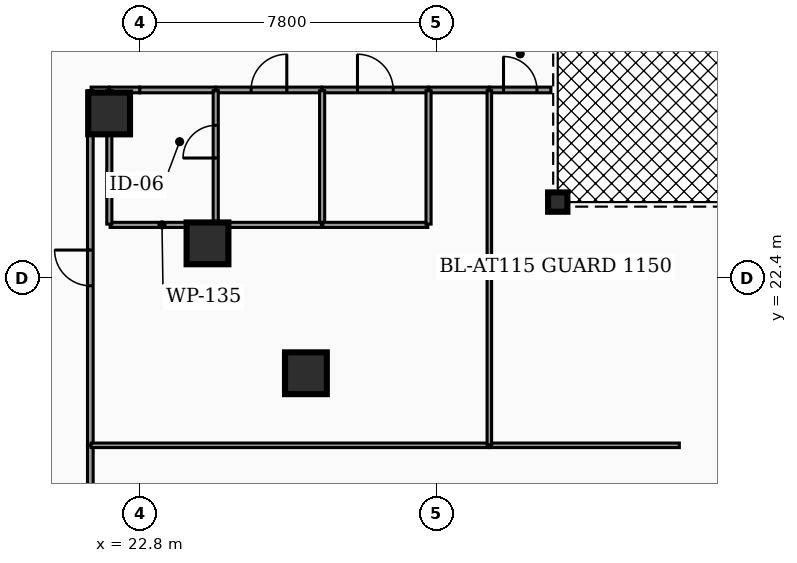
"""IFC4 building model, lengths in metres.
Left out: names, types, materials, properties, quantities, classifications, styles, units other than length and angle.
Written with IfcOpenShell. Run it as: python <this file> out.ifc"""

import sys

from ifc_helpers import new_model, si_unit, direction, frame, frame_2d, origin, origin_2d, place, context, subcontext, project, spatial, rectangle, hollow_rectangle, hollow_circle, extrude, element, fill, save


model = new_model("IFC4")
c1 = context("Model", 3, precision=1e-05, world=origin(), true_north=direction((0.0, 1.0)))
c2 = subcontext(c1, "Body", "Model", "MODEL_VIEW")
j1 = project(units=[si_unit("LENGTHUNIT", "METRE"), si_unit("PLANEANGLEUNIT", "RADIAN")], contexts=[c1])
p1 = place(None, origin())
s1 = spatial("IfcSite", under=j1, at=p1, CompositionType="ELEMENT")
p2 = place(p1, origin())
s2 = spatial("IfcBuilding", under=s1, at=p2, CompositionType="ELEMENT")
p3 = place(p2, frame((0.0, 0.0, 13.94)))
s3 = spatial("IfcBuildingStorey", under=s2, at=p3, CompositionType="ELEMENT", Elevation=13.94)
for number, where, z_axis, x_axis in (
    (1, (21.994, 26.732, 0.0), (0.0, 0.0, 1.0), (1.0, 0.0, 0.0)),
    (2, (24.583, 23.314, 0.0), (0.0, 0.0, 1.0), (1.0, 0.0, 0.0)),
    (3, (27.173, 19.896, 0.0), (0.0, 0.0, 1.0), (1.0, 0.0, 0.0)),
):
    element("IfcColumn", number, at=place(p3, frame(where, z_axis=z_axis, x_axis=x_axis)), inside=s3, PredefinedType="COLUMN", context=c2, shape_type="SweptSolid", body=[
        extrude(hollow_rectangle(XDim=1.1, YDim=1.1, WallThickness=0.055, at=origin_2d()), origin(), (0.0, 0.0, 1.0), 4.14),
    ])
p4 = place(p3, frame((33.8, 24.4, 0.0), z_axis=(0.0, 0.0, 1.0), x_axis=(1.0, 0.0, 0.0)))
e4 = element("IfcColumn", 4, at=p4, inside=s3, PredefinedType="COLUMN", context=c2, shape_type="SweptSolid", body=[
    extrude(hollow_circle(Radius=0.254, WallThickness=0.02, at=origin_2d()), origin(), (0.0, 0.0, 1.0), 4.14),
])
p5 = place(p3, frame((22.8, 27.35, 0.0), z_axis=(0.0, 0.0, 1.0), x_axis=(1.0, 0.0, 0.0)))
e5 = element("IfcWall", 5, at=p5, inside=s3, PredefinedType="PARTITIONING", context=c2, shape_type="SweptSolid", body=[
    extrude(rectangle(XDim=1.995, YDim=0.15, at=frame_2d((0.998, 0.0))), origin(), (0.0, 0.0, 1.0), 3.097),
])
p6 = place(p3, frame((22.005, 27.35, 0.0), z_axis=(0.0, 0.0, 1.0), x_axis=(1.0, 0.0, 0.0)))
e6 = element("IfcWall", 6, at=p6, inside=s3, PredefinedType="PARTITIONING", context=c2, shape_type="SweptSolid", body=[
    extrude(rectangle(XDim=0.795, YDim=0.15, at=frame_2d((0.397, 0.0))), origin(), (0.0, 0.0, 1.0), 3.097),
])
p7 = place(p3, frame((24.805, 27.35, 0.0), z_axis=(0.0, 0.0, 1.0), x_axis=(1.0, 0.0, 0.0)))
e7 = element("IfcWall", 7, at=p7, inside=s3, PredefinedType="PARTITIONING", context=c2, shape_type="SweptSolid", body=[
    extrude(rectangle(XDim=2.79, YDim=0.15, at=frame_2d((1.395, 0.0))), origin(), (0.0, 0.0, 1.0), 3.097),
])
p8 = place(p7, frame((0.925, 0.0, 0.0)))
e8 = element("IfcOpeningElement", 8, at=p8, cuts=e7, PredefinedType="OPENING", context=c2, shape_type="SweptSolid", body=[
    extrude(rectangle(XDim=0.94, YDim=2.05, at=frame_2d((0.47, 1.025))), frame((0.0, 0.085, 0.0), z_axis=(0.0, -1.0, 0.0), x_axis=(1.0, 0.0, 0.0)), (0.0, 0.0, 1.0), 0.17),
])
p9 = place(p3, frame((27.605, 27.35, 0.0), z_axis=(0.0, 0.0, 1.0), x_axis=(1.0, 0.0, 0.0)))
e9 = element("IfcWall", 9, at=p9, inside=s3, PredefinedType="PARTITIONING", context=c2, shape_type="SweptSolid", body=[
    extrude(rectangle(XDim=2.79, YDim=0.15, at=frame_2d((1.395, 0.0))), origin(), (0.0, 0.0, 1.0), 3.097),
])
p10 = place(p9, frame((0.925, 0.0, 0.0)))
e10 = element("IfcOpeningElement", 10, at=p10, cuts=e9, PredefinedType="OPENING", context=c2, shape_type="SweptSolid", body=[
    extrude(rectangle(XDim=0.94, YDim=2.05, at=frame_2d((0.47, 1.025))), frame((0.0, 0.085, 0.0), z_axis=(0.0, -1.0, 0.0), x_axis=(1.0, 0.0, 0.0)), (0.0, 0.0, 1.0), 0.17),
])
p11 = place(p3, frame((21.5, 12.02, 0.0), z_axis=(0.0, 0.0, 1.0), x_axis=(0.0, 1.0, 0.0)))
e11 = element("IfcWall", 11, at=p11, inside=s3, PredefinedType="PARTITIONING", context=c2, shape_type="SweptSolid", body=[
    extrude(rectangle(XDim=5.975, YDim=0.15, at=frame_2d((2.988, 0.0))), origin(), (0.0, 0.0, 1.0), 3.097),
])
p12 = place(p11, frame((2.427, 0.0, 0.0)))
e12 = element("IfcOpeningElement", 12, at=p12, cuts=e11, PredefinedType="OPENING", context=c2, shape_type="SweptSolid", body=[
    extrude(rectangle(XDim=1.12, YDim=2.05, at=frame_2d((0.56, 1.025))), frame((0.0, 0.085, 0.0), z_axis=(0.0, -1.0, 0.0), x_axis=(1.0, 0.0, 0.0)), (0.0, 0.0, 1.0), 0.17),
])
p13 = place(p3, frame((30.405, 27.35, 0.0), z_axis=(0.0, 0.0, 1.0), x_axis=(1.0, 0.0, 0.0)))
e13 = element("IfcWall", 13, at=p13, inside=s3, PredefinedType="PARTITIONING", context=c2, shape_type="SweptSolid", body=[
    extrude(rectangle(XDim=1.59, YDim=0.15, at=frame_2d((0.795, 0.0))), origin(), (0.0, 0.0, 1.0), 3.097),
])
p14 = place(p3, frame((21.52, 27.35, 0.0), z_axis=(0.0, 0.0, 1.0), x_axis=(1.0, 0.0, 0.0)))
e14 = element("IfcWall", 14, at=p14, inside=s3, PredefinedType="PARTITIONING", context=c2, shape_type="SweptSolid", body=[
    extrude(rectangle(XDim=0.475, YDim=0.15, at=frame_2d((0.238, 0.0))), origin(), (0.0, 0.0, 1.0), 3.097),
])
p15 = place(p3, frame((21.5, 18.005, 0.0), z_axis=(0.0, 0.0, 1.0), x_axis=(0.0, 1.0, 0.0)))
e15 = element("IfcWall", 15, at=p15, inside=s3, PredefinedType="PARTITIONING", context=c2, shape_type="SweptSolid", body=[
    extrude(rectangle(XDim=9.325, YDim=0.15, at=frame_2d((4.663, 0.0))), origin(), (0.0, 0.0, 1.0), 3.097),
])
p16 = place(p15, frame((4.192, 0.0, 0.0)))
e16 = element("IfcOpeningElement", 16, at=p16, cuts=e15, PredefinedType="OPENING", context=c2, shape_type="SweptSolid", body=[
    extrude(rectangle(XDim=0.94, YDim=2.05, at=frame_2d((0.47, 1.025))), frame((0.0, 0.085, 0.0), z_axis=(0.0, -1.0, 0.0), x_axis=(1.0, 0.0, 0.0)), (0.0, 0.0, 1.0), 0.17),
])
p17 = place(p3, frame((32.005, 27.35, 0.0), z_axis=(0.0, 0.0, 1.0), x_axis=(1.0, 0.0, 0.0)))
e17 = element("IfcWall", 17, at=p17, inside=s3, PredefinedType="PARTITIONING", context=c2, shape_type="SweptSolid", body=[
    extrude(rectangle(XDim=1.615, YDim=0.15, at=frame_2d((0.808, 0.0))), origin(), (0.0, 0.0, 1.0), 3.097),
])
p18 = place(p17, frame((0.367, 0.0, 0.0)))
e18 = element("IfcOpeningElement", 18, at=p18, cuts=e17, PredefinedType="OPENING", context=c2, shape_type="SweptSolid", body=[
    extrude(rectangle(XDim=0.88, YDim=2.05, at=frame_2d((0.44, 1.025))), frame((0.0, 0.085, 0.0), z_axis=(0.0, -1.0, 0.0), x_axis=(1.0, 0.0, 0.0)), (0.0, 0.0, 1.0), 0.17),
])
p19 = place(p3, frame((24.8, 23.848, 0.0), z_axis=(0.0, 0.0, 1.0), x_axis=(0.0, 1.0, 0.0)))
e19 = element("IfcWall", 19, at=p19, inside=s3, PredefinedType="PARTITIONING", context=c2, shape_type="SweptSolid", body=[
    extrude(rectangle(XDim=3.482, YDim=0.135, at=frame_2d((1.741, 0.0))), origin(), (0.0, 0.0, 1.0), 3.097),
])
p20 = place(p19, frame((1.711, 0.0, 0.0)))
e20 = element("IfcOpeningElement", 20, at=p20, cuts=e19, PredefinedType="OPENING", context=c2, shape_type="SweptSolid", body=[
    extrude(rectangle(XDim=0.86, YDim=2.05, at=frame_2d((0.43, 1.025))), frame((0.0, 0.077, 0.0), z_axis=(0.0, -1.0, 0.0), x_axis=(1.0, 0.0, 0.0)), (0.0, 0.0, 1.0), 0.155),
])
p21 = place(p3, frame((22.02, 23.8, 0.0), z_axis=(0.0, 0.0, 1.0), x_axis=(1.0, 0.0, 0.0)))
e21 = element("IfcWall", 21, at=p21, inside=s3, PredefinedType="PARTITIONING", context=c2, shape_type="SweptSolid", body=[
    extrude(rectangle(XDim=2.732, YDim=0.135, at=frame_2d((1.366, 0.0))), origin(), (0.0, 0.0, 1.0), 3.097),
])
for number, where, z_axis, x_axis in (
    (22, (22.0, 23.82, 0.0), (0.0, 0.0, 1.0), (0.0, 1.0, 0.0)),
    (23, (27.6, 23.82, 0.0), (0.0, 0.0, 1.0), (0.0, 1.0, 0.0)),
):
    element("IfcWall", number, at=place(p3, frame(where, z_axis=z_axis, x_axis=x_axis)), inside=s3, PredefinedType="PARTITIONING", context=c2, shape_type="SweptSolid", body=[
        extrude(rectangle(XDim=3.51, YDim=0.135, at=frame_2d((1.755, 0.0))), origin(), (0.0, 0.0, 1.0), 3.097),
    ])
p22 = place(p3, frame((24.848, 23.8, 0.0), z_axis=(0.0, 0.0, 1.0), x_axis=(1.0, 0.0, 0.0)))
e24 = element("IfcWall", 24, at=p22, inside=s3, PredefinedType="PARTITIONING", context=c2, shape_type="SweptSolid", body=[
    extrude(rectangle(XDim=2.732, YDim=0.135, at=frame_2d((1.366, 0.0))), origin(), (0.0, 0.0, 1.0), 3.097),
])
p23 = place(p3, frame((27.62, 23.8, 0.0), z_axis=(0.0, 0.0, 1.0), x_axis=(1.0, 0.0, 0.0)))
e25 = element("IfcWall", 25, at=p23, inside=s3, PredefinedType="PARTITIONING", context=c2, shape_type="SweptSolid", body=[
    extrude(rectangle(XDim=2.76, YDim=0.135, at=frame_2d((1.38, 0.0))), origin(), (0.0, 0.0, 1.0), 3.097),
])
p24 = place(p3, frame((30.4, 23.82, 0.0), z_axis=(0.0, 0.0, 1.0), x_axis=(0.0, 1.0, 0.0)))
e26 = element("IfcWall", 26, at=p24, inside=s3, PredefinedType="PARTITIONING", context=c2, shape_type="SweptSolid", body=[
    extrude(rectangle(XDim=3.51, YDim=0.135, at=frame_2d((1.755, 0.0))), origin(), (0.0, 0.0, 1.0), 3.097),
])
p25 = place(p3, frame((21.52, 18.0, 0.0), z_axis=(0.0, 0.0, 1.0), x_axis=(1.0, 0.0, 0.0)))
e27 = element("IfcWall", 27, at=p25, inside=s3, PredefinedType="PARTITIONING", context=c2, shape_type="SweptSolid", body=[
    extrude(rectangle(XDim=10.46, YDim=0.12, at=frame_2d((5.23, 0.0))), origin(), (0.0, 0.0, 1.0), 3.097),
])
p26 = place(p3, frame((32.02, 18.0, 0.0), z_axis=(0.0, 0.0, 1.0), x_axis=(1.0, 0.0, 0.0)))
e28 = element("IfcWall", 28, at=p26, inside=s3, PredefinedType="PARTITIONING", context=c2, shape_type="SweptSolid", body=[
    extrude(rectangle(XDim=4.98, YDim=0.12, at=frame_2d((2.49, 0.0))), origin(), (0.0, 0.0, 1.0), 3.097),
])
p27 = place(p3, frame((32.0, 18.02, 0.0), z_axis=(0.0, 0.0, 1.0), x_axis=(0.0, 1.0, 0.0)))
e29 = element("IfcWall", 29, at=p27, inside=s3, PredefinedType="PARTITIONING", context=c2, shape_type="SweptSolid", body=[
    extrude(rectangle(XDim=9.31, YDim=0.12, at=frame_2d((4.655, 0.0))), origin(), (0.0, 0.0, 1.0), 3.097),
])
p28 = place(p8, origin())
e30 = element("IfcDoor", 30, at=p28, inside=s3, OperationType="SINGLE_SWING_RIGHT", PredefinedType="DOOR", context=c2, shape_type="SweptSolid", body=[
    extrude(rectangle(XDim=0.94, YDim=2.05, at=frame_2d((0.47, 1.025))), frame((0.0, 0.025, 0.0), z_axis=(0.0, -1.0, 0.0), x_axis=(1.0, 0.0, 0.0)), (0.0, 0.0, 1.0), 0.05),
])
fill(e8, e30)
p29 = place(p10, origin())
e31 = element("IfcDoor", 31, at=p29, inside=s3, OperationType="SINGLE_SWING_LEFT", PredefinedType="DOOR", context=c2, shape_type="SweptSolid", body=[
    extrude(rectangle(XDim=0.94, YDim=2.05, at=frame_2d((0.47, 1.025))), frame((0.0, 0.025, 0.0), z_axis=(0.0, -1.0, 0.0), x_axis=(1.0, 0.0, 0.0)), (0.0, 0.0, 1.0), 0.05),
])
fill(e10, e31)
p30 = place(p16, origin())
e32 = element("IfcDoor", 32, at=p30, inside=s3, OperationType="SINGLE_SWING_RIGHT", PredefinedType="DOOR", context=c2, shape_type="SweptSolid", body=[
    extrude(rectangle(XDim=0.94, YDim=2.05, at=frame_2d((0.47, 1.025))), frame((0.0, 0.025, 0.0), z_axis=(0.0, -1.0, 0.0), x_axis=(1.0, 0.0, 0.0)), (0.0, 0.0, 1.0), 0.05),
])
fill(e16, e32)
p31 = place(p18, origin())
e33 = element("IfcDoor", 33, at=p31, inside=s3, OperationType="SINGLE_SWING_LEFT", PredefinedType="DOOR", context=c2, shape_type="SweptSolid", body=[
    extrude(rectangle(XDim=0.88, YDim=2.05, at=frame_2d((0.44, 1.025))), frame((0.0, 0.025, 0.0), z_axis=(0.0, -1.0, 0.0), x_axis=(1.0, 0.0, 0.0)), (0.0, 0.0, 1.0), 0.05),
])
fill(e18, e33)
p32 = place(p20, origin())
e34 = element("IfcDoor", 34, at=p32, inside=s3, OperationType="SINGLE_SWING_LEFT", PredefinedType="DOOR", context=c2, shape_type="SweptSolid", body=[
    extrude(rectangle(XDim=0.86, YDim=2.05, at=frame_2d((0.43, 1.025))), frame((0.0, 0.025, 0.0), z_axis=(0.0, -1.0, 0.0), x_axis=(1.0, 0.0, 0.0)), (0.0, 0.0, 1.0), 0.05),
])
fill(e20, e34)
save(model, sys.argv[1])
